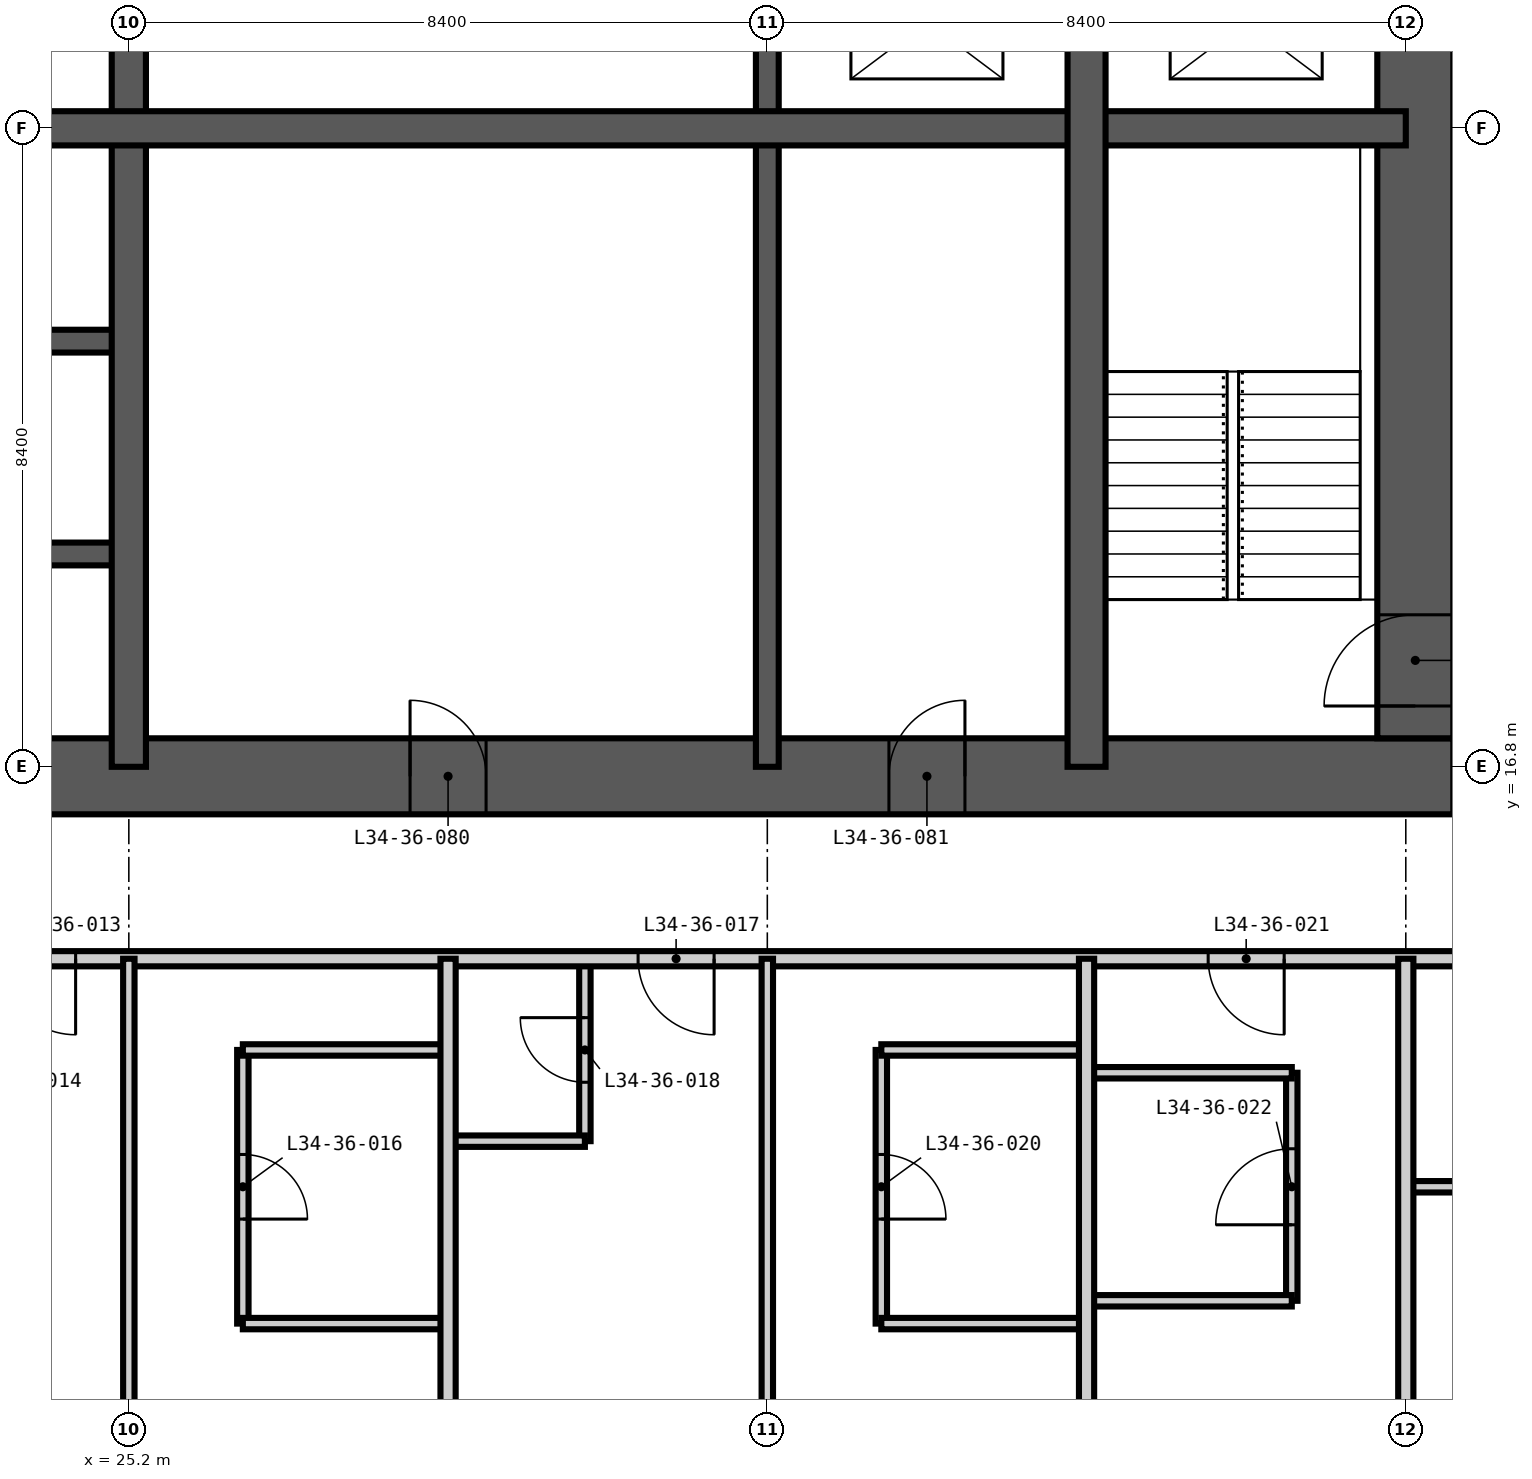
"""IFC4 building model, lengths in metres.
Left out: names, types, materials, properties, quantities, classifications, styles, units other than length and angle.
Written with IfcOpenShell. Run it as: python <this file> out.ifc"""

import sys

from ifc_helpers import new_model, si_unit, direction, frame, frame_2d, origin, place, context, subcontext, project, spatial, rectangle, extrude, element, fill, save


model = new_model("IFC4")
c1 = context("Model", 3, precision=1e-05, world=origin(), true_north=direction((0.0, 1.0)))
c2 = subcontext(c1, "Body", "Model", "MODEL_VIEW")
j1 = project(units=[si_unit("LENGTHUNIT", "METRE"), si_unit("PLANEANGLEUNIT", "RADIAN")], contexts=[c1])
p1 = place(None, origin())
s1 = spatial("IfcSite", under=j1, at=p1, CompositionType="ELEMENT")
p2 = place(p1, origin())
s2 = spatial("IfcBuilding", under=s1, at=p2, CompositionType="ELEMENT")
p3 = place(p2, frame((0.0, 0.0, 133.2)))
s3 = spatial("IfcBuildingStorey", under=s2, at=p3, CompositionType="ELEMENT", Elevation=133.2)
p4 = place(p3, frame((16.175, 16.675, -0.35), z_axis=(0.0, 0.0, 1.0), x_axis=(1.0, 0.0, 0.0)))
e1 = element("IfcWall", 1, at=p4, inside=s3, PredefinedType="SHEAR", context=c2, shape_type="SweptSolid", body=[
    extrude(rectangle(XDim=26.45, YDim=1.0, at=frame_2d((13.225, 0.0))), origin(), (0.0, 0.0, 1.0), 3.6),
])
p5 = place(p4, frame((12.725, 0.0, 0.35)))
e2 = element("IfcOpeningElement", 2, at=p5, cuts=e1, PredefinedType="OPENING", context=c2, shape_type="SweptSolid", body=[
    extrude(rectangle(XDim=1.0, YDim=2.1, at=frame_2d((0.5, 1.05))), frame((0.0, 0.51, 0.0), z_axis=(0.0, -1.0, 0.0), x_axis=(1.0, 0.0, 0.0)), (0.0, 0.0, 1.0), 1.02),
])
p6 = place(p4, frame((19.025, 0.0, 0.35)))
e3 = element("IfcOpeningElement", 3, at=p6, cuts=e1, PredefinedType="OPENING", context=c2, shape_type="SweptSolid", body=[
    extrude(rectangle(XDim=1.0, YDim=2.1, at=frame_2d((0.5, 1.05))), frame((0.0, 0.51, 0.0), z_axis=(0.0, -1.0, 0.0), x_axis=(1.0, 0.0, 0.0)), (0.0, 0.0, 1.0), 1.02),
])
p7 = place(p3, frame((42.125, 17.175, -0.35), z_axis=(0.0, 0.0, 1.0), x_axis=(0.0, 1.0, 0.0)))
e4 = element("IfcWall", 4, at=p7, inside=s3, PredefinedType="SHEAR", context=c2, shape_type="SweptSolid", body=[
    extrude(rectangle(XDim=24.45, YDim=1.0, at=frame_2d((12.225, 0.0))), origin(), (0.0, 0.0, 1.0), 3.6),
])
p8 = place(p7, frame((0.425, 0.0, 0.35)))
e5 = element("IfcOpeningElement", 5, at=p8, cuts=e4, PredefinedType="OPENING", context=c2, shape_type="SweptSolid", body=[
    extrude(rectangle(XDim=1.2, YDim=2.2, at=frame_2d((0.6, 1.1))), frame((0.0, 0.51, 0.0), z_axis=(0.0, -1.0, 0.0), x_axis=(1.0, 0.0, 0.0)), (0.0, 0.0, 1.0), 1.02),
])
p9 = place(p7, frame((11.325, 0.0, 0.35)))
e6 = element("IfcOpeningElement", 6, at=p9, cuts=e4, PredefinedType="OPENING", context=c2, shape_type="SweptSolid", body=[
    extrude(rectangle(XDim=1.8, YDim=2.2, at=frame_2d((0.9, 1.1))), frame((0.0, 0.51, 0.0), z_axis=(0.0, -1.0, 0.0), x_axis=(1.0, 0.0, 0.0)), (0.0, 0.0, 1.0), 1.02),
])
p10 = place(p7, frame((20.125, 0.0, 0.35)))
e7 = element("IfcOpeningElement", 7, at=p10, cuts=e4, PredefinedType="OPENING", context=c2, shape_type="SweptSolid", body=[
    extrude(rectangle(XDim=1.0, YDim=2.1, at=frame_2d((0.5, 1.05))), frame((0.0, 0.51, 0.0), z_axis=(0.0, -1.0, 0.0), x_axis=(1.0, 0.0, 0.0)), (0.0, 0.0, 1.0), 1.02),
])
p11 = place(p3, frame((33.6, 16.8, -0.35), z_axis=(0.0, 0.0, 1.0), x_axis=(0.0, 1.0, 0.0)))
e8 = element("IfcWall", 8, at=p11, inside=s3, PredefinedType="SHEAR", context=c2, shape_type="SweptSolid", body=[
    extrude(rectangle(XDim=25.2, YDim=0.3, at=frame_2d((12.6, 0.0))), origin(), (0.0, 0.0, 1.0), 3.6),
])
p12 = place(p11, frame((22.5, 0.0, 0.35)))
e9 = element("IfcOpeningElement", 9, at=p12, cuts=e8, PredefinedType="OPENING", context=c2, shape_type="SweptSolid", body=[
    extrude(rectangle(XDim=1.2, YDim=2.2, at=frame_2d((0.6, 1.1))), frame((0.0, 0.16, 0.0), z_axis=(0.0, -1.0, 0.0), x_axis=(1.0, 0.0, 0.0)), (0.0, 0.0, 1.0), 0.32),
])
p13 = place(p11, frame((18.3, 0.0, 0.35)))
e10 = element("IfcOpeningElement", 10, at=p13, cuts=e8, PredefinedType="OPENING", context=c2, shape_type="SweptSolid", body=[
    extrude(rectangle(XDim=1.2, YDim=2.2, at=frame_2d((0.6, 1.1))), frame((0.0, 0.16, 0.0), z_axis=(0.0, -1.0, 0.0), x_axis=(1.0, 0.0, 0.0)), (0.0, 0.0, 1.0), 0.32),
])
for number, where, z_axis, x_axis in (
    (11, (16.8, 19.6, -0.35), (0.0, 0.0, 1.0), (1.0, 0.0, 0.0)),
    (12, (16.8, 22.4, -0.35), (0.0, 0.0, 1.0), (1.0, 0.0, 0.0)),
):
    element("IfcWall", number, at=place(p3, frame(where, z_axis=z_axis, x_axis=x_axis)), inside=s3, PredefinedType="SHEAR", context=c2, shape_type="SweptSolid", body=[
        extrude(rectangle(XDim=8.4, YDim=0.3, at=frame_2d((4.2, 0.0))), origin(), (0.0, 0.0, 1.0), 3.6),
    ])
p14 = place(p3, frame((25.2, 16.8, -0.35), z_axis=(0.0, 0.0, 1.0), x_axis=(0.0, 1.0, 0.0)))
e13 = element("IfcWall", 13, at=p14, inside=s3, PredefinedType="SHEAR", context=c2, shape_type="SweptSolid", body=[
    extrude(rectangle(XDim=25.2, YDim=0.45, at=frame_2d((12.6, 0.0))), origin(), (0.0, 0.0, 1.0), 3.6),
])
p15 = place(p14, frame((12.1, 0.0, 0.35)))
e14 = element("IfcOpeningElement", 14, at=p15, cuts=e13, PredefinedType="OPENING", context=c2, shape_type="SweptSolid", body=[
    extrude(rectangle(XDim=1.0, YDim=2.1, at=frame_2d((0.5, 1.05))), frame((0.0, 0.235, 0.0), z_axis=(0.0, -1.0, 0.0), x_axis=(1.0, 0.0, 0.0)), (0.0, 0.0, 1.0), 0.47),
])
p16 = place(p3, frame((16.8, 25.2, -0.35), z_axis=(0.0, 0.0, 1.0), x_axis=(1.0, 0.0, 0.0)))
e15 = element("IfcWall", 15, at=p16, inside=s3, PredefinedType="SHEAR", context=c2, shape_type="SweptSolid", body=[
    extrude(rectangle(XDim=25.2, YDim=0.45, at=frame_2d((12.6, 0.0))), origin(), (0.0, 0.0, 1.0), 3.6),
])
p17 = place(p3, frame((37.8, 16.8, -0.35), z_axis=(0.0, 0.0, 1.0), x_axis=(0.0, 1.0, 0.0)))
e16 = element("IfcWall", 16, at=p17, inside=s3, PredefinedType="SHEAR", context=c2, shape_type="SweptSolid", body=[
    extrude(rectangle(XDim=11.2, YDim=0.5, at=frame_2d((5.6, 0.0))), origin(), (0.0, 0.0, 1.0), 3.6),
])
p18 = place(p3, frame((26.7, 9.475, 0.0), z_axis=(0.0, 0.0, 1.0), x_axis=(0.0, 1.0, 0.0)))
e17 = element("IfcWall", 17, at=p18, inside=s3, PredefinedType="PARTITIONING", context=c2, shape_type="SweptSolid", body=[
    extrude(rectangle(XDim=3.6, YDim=0.15, at=frame_2d((1.8, 0.0))), origin(), (0.0, 0.0, 1.0), 3.25),
])
p19 = place(p18, frame((1.375, 0.0, 0.0)))
e18 = element("IfcOpeningElement", 18, at=p19, cuts=e17, PredefinedType="OPENING", context=c2, shape_type="SweptSolid", body=[
    extrude(rectangle(XDim=0.85, YDim=2.1, at=frame_2d((0.425, 1.05))), frame((0.0, 0.085, 0.0), z_axis=(0.0, -1.0, 0.0), x_axis=(1.0, 0.0, 0.0)), (0.0, 0.0, 1.0), 0.17),
])
p20 = place(p3, frame((31.2, 11.875, 0.0), z_axis=(0.0, 0.0, 1.0), x_axis=(0.0, 1.0, 0.0)))
e19 = element("IfcWall", 19, at=p20, inside=s3, PredefinedType="PARTITIONING", context=c2, shape_type="SweptSolid", body=[
    extrude(rectangle(XDim=2.4, YDim=0.15, at=frame_2d((1.2, 0.0))), origin(), (0.0, 0.0, 1.0), 3.25),
])
p21 = place(p20, frame((0.775, 0.0, 0.0)))
e20 = element("IfcOpeningElement", 20, at=p21, cuts=e19, PredefinedType="OPENING", context=c2, shape_type="SweptSolid", body=[
    extrude(rectangle(XDim=0.85, YDim=2.1, at=frame_2d((0.425, 1.05))), frame((0.0, 0.085, 0.0), z_axis=(0.0, -1.0, 0.0), x_axis=(1.0, 0.0, 0.0)), (0.0, 0.0, 1.0), 0.17),
])
p22 = place(p3, frame((35.1, 9.475, 0.0), z_axis=(0.0, 0.0, 1.0), x_axis=(0.0, 1.0, 0.0)))
e21 = element("IfcWall", 21, at=p22, inside=s3, PredefinedType="PARTITIONING", context=c2, shape_type="SweptSolid", body=[
    extrude(rectangle(XDim=3.6, YDim=0.15, at=frame_2d((1.8, 0.0))), origin(), (0.0, 0.0, 1.0), 3.25),
])
p23 = place(p22, frame((1.375, 0.0, 0.0)))
e22 = element("IfcOpeningElement", 22, at=p23, cuts=e21, PredefinedType="OPENING", context=c2, shape_type="SweptSolid", body=[
    extrude(rectangle(XDim=0.85, YDim=2.1, at=frame_2d((0.425, 1.05))), frame((0.0, 0.085, 0.0), z_axis=(0.0, -1.0, 0.0), x_axis=(1.0, 0.0, 0.0)), (0.0, 0.0, 1.0), 0.17),
])
p24 = place(p3, frame((40.5, 9.775, 0.0), z_axis=(0.0, 0.0, 1.0), x_axis=(0.0, 1.0, 0.0)))
e23 = element("IfcWall", 23, at=p24, inside=s3, PredefinedType="PARTITIONING", context=c2, shape_type="SweptSolid", body=[
    extrude(rectangle(XDim=3.0, YDim=0.15, at=frame_2d((1.5, 0.0))), origin(), (0.0, 0.0, 1.0), 3.25),
])
p25 = place(p24, frame((1.0, 0.0, 0.0)))
e24 = element("IfcOpeningElement", 24, at=p25, cuts=e23, PredefinedType="OPENING", context=c2, shape_type="SweptSolid", body=[
    extrude(rectangle(XDim=1.0, YDim=2.1, at=frame_2d((0.5, 1.05))), frame((0.0, 0.085, 0.0), z_axis=(0.0, -1.0, 0.0), x_axis=(1.0, 0.0, 0.0)), (0.0, 0.0, 1.0), 0.17),
])
for number, where, z_axis, x_axis in (
    (25, (26.7, 9.475, 0.0), (0.0, 0.0, 1.0), (1.0, 0.0, 0.0)),
    (26, (35.1, 9.475, 0.0), (0.0, 0.0, 1.0), (1.0, 0.0, 0.0)),
    (27, (37.8, 9.775, 0.0), (0.0, 0.0, 1.0), (1.0, 0.0, 0.0)),
):
    element("IfcWall", number, at=place(p3, frame(where, z_axis=z_axis, x_axis=x_axis)), inside=s3, PredefinedType="PARTITIONING", context=c2, shape_type="SweptSolid", body=[
        extrude(rectangle(XDim=2.7, YDim=0.15, at=frame_2d((1.35, 0.0))), origin(), (0.0, 0.0, 1.0), 3.25),
    ])
p26 = place(p3, frame((42.0, 11.275, 0.0), z_axis=(0.0, 0.0, 1.0), x_axis=(1.0, 0.0, 0.0)))
e28 = element("IfcWall", 28, at=p26, inside=s3, PredefinedType="PARTITIONING", context=c2, shape_type="SweptSolid", body=[
    extrude(rectangle(XDim=3.725, YDim=0.15, at=frame_2d((1.863, 0.0))), origin(), (0.0, 0.0, 1.0), 3.25),
])
p27 = place(p26, frame((1.438, 0.0, 0.0)))
e29 = element("IfcOpeningElement", 29, at=p27, cuts=e28, PredefinedType="OPENING", context=c2, shape_type="SweptSolid", body=[
    extrude(rectangle(XDim=0.85, YDim=2.1, at=frame_2d((0.425, 1.05))), frame((0.0, 0.085, 0.0), z_axis=(0.0, -1.0, 0.0), x_axis=(1.0, 0.0, 0.0)), (0.0, 0.0, 1.0), 0.17),
])
p28 = place(p3, frame((29.4, 11.875, 0.0), z_axis=(0.0, 0.0, 1.0), x_axis=(1.0, 0.0, 0.0)))
e30 = element("IfcWall", 30, at=p28, inside=s3, PredefinedType="PARTITIONING", context=c2, shape_type="SweptSolid", body=[
    extrude(rectangle(XDim=1.8, YDim=0.15, at=frame_2d((0.9, 0.0))), origin(), (0.0, 0.0, 1.0), 3.25),
])
for number, where, z_axis, x_axis in (
    (31, (37.8, 12.775, 0.0), (0.0, 0.0, 1.0), (1.0, 0.0, 0.0)),
    (32, (26.7, 13.075, 0.0), (0.0, 0.0, 1.0), (1.0, 0.0, 0.0)),
    (33, (35.1, 13.075, 0.0), (0.0, 0.0, 1.0), (1.0, 0.0, 0.0)),
):
    element("IfcWall", number, at=place(p3, frame(where, z_axis=z_axis, x_axis=x_axis)), inside=s3, PredefinedType="PARTITIONING", context=c2, shape_type="SweptSolid", body=[
        extrude(rectangle(XDim=2.7, YDim=0.15, at=frame_2d((1.35, 0.0))), origin(), (0.0, 0.0, 1.0), 3.25),
    ])
p29 = place(p3, frame((45.725, 14.275, 0.0), z_axis=(0.0, 0.0, 1.0), x_axis=(-1.0, 0.0, 0.0)))
e34 = element("IfcWall", 34, at=p29, inside=s3, PredefinedType="PARTITIONING", context=c2, shape_type="SweptSolid", body=[
    extrude(rectangle(XDim=33.125, YDim=0.2, at=frame_2d((16.562, 0.0))), origin(), (0.0, 0.0, 1.0), 3.25),
])
p30 = place(p29, frame((26.325, 0.0, 0.0)))
e35 = element("IfcOpeningElement", 35, at=p30, cuts=e34, PredefinedType="OPENING", context=c2, shape_type="SweptSolid", body=[
    extrude(rectangle(XDim=1.0, YDim=2.2, at=frame_2d((0.5, 1.1))), frame((0.0, 0.11, 0.0), z_axis=(0.0, -1.0, 0.0), x_axis=(1.0, 0.0, 0.0)), (0.0, 0.0, 1.0), 0.22),
])
p31 = place(p29, frame((21.225, 0.0, 0.0)))
e36 = element("IfcOpeningElement", 36, at=p31, cuts=e34, PredefinedType="OPENING", context=c2, shape_type="SweptSolid", body=[
    extrude(rectangle(XDim=1.0, YDim=2.2, at=frame_2d((0.5, 1.1))), frame((0.0, 0.11, 0.0), z_axis=(0.0, -1.0, 0.0), x_axis=(1.0, 0.0, 0.0)), (0.0, 0.0, 1.0), 0.22),
])
p32 = place(p29, frame((12.825, 0.0, 0.0)))
e37 = element("IfcOpeningElement", 37, at=p32, cuts=e34, PredefinedType="OPENING", context=c2, shape_type="SweptSolid", body=[
    extrude(rectangle(XDim=1.0, YDim=2.2, at=frame_2d((0.5, 1.1))), frame((0.0, 0.11, 0.0), z_axis=(0.0, -1.0, 0.0), x_axis=(1.0, 0.0, 0.0)), (0.0, 0.0, 1.0), 0.22),
])
p33 = place(p29, frame((5.325, 0.0, 0.0)))
e38 = element("IfcOpeningElement", 38, at=p33, cuts=e34, PredefinedType="OPENING", context=c2, shape_type="SweptSolid", body=[
    extrude(rectangle(XDim=1.0, YDim=2.2, at=frame_2d((0.5, 1.1))), frame((0.0, 0.11, 0.0), z_axis=(0.0, -1.0, 0.0), x_axis=(1.0, 0.0, 0.0)), (0.0, 0.0, 1.0), 0.22),
])
for number, where, z_axis, x_axis in (
    (39, (29.4, -0.018, 0.0), (0.0, 0.0, 1.0), (0.0, 1.0, 0.0)),
    (40, (37.8, -0.018, 0.0), (0.0, 0.0, 1.0), (0.0, 1.0, 0.0)),
    (41, (42.0, -0.018, 0.0), (0.0, 0.0, 1.0), (0.0, 1.0, 0.0)),
):
    element("IfcWall", number, at=place(p3, frame(where, z_axis=z_axis, x_axis=x_axis)), inside=s3, PredefinedType="PARTITIONING", context=c2, shape_type="SweptSolid", body=[
        extrude(rectangle(XDim=14.293, YDim=0.2, at=frame_2d((7.146, 0.0))), origin(), (0.0, 0.0, 1.0), 3.25),
    ])
p34 = place(p3, frame((25.2, -0.018, 0.0), z_axis=(0.0, 0.0, 1.0), x_axis=(0.0, 1.0, 0.0)))
e42 = element("IfcWall", 42, at=p34, inside=s3, PredefinedType="PARTITIONING", context=c2, shape_type="SweptSolid", body=[
    extrude(rectangle(XDim=14.293, YDim=0.15, at=frame_2d((7.146, 0.0))), origin(), (0.0, 0.0, 1.0), 3.25),
])
p35 = place(p34, frame((6.706, 0.0, 0.0)))
e43 = element("IfcOpeningElement", 43, at=p35, cuts=e42, PredefinedType="OPENING", context=c2, shape_type="SweptSolid", body=[
    extrude(rectangle(XDim=0.9, YDim=2.1, at=frame_2d((0.45, 1.05))), frame((0.0, 0.085, 0.0), z_axis=(0.0, -1.0, 0.0), x_axis=(1.0, 0.0, 0.0)), (0.0, 0.0, 1.0), 0.17),
])
p36 = place(p3, frame((33.6, -0.018, 0.0), z_axis=(0.0, 0.0, 1.0), x_axis=(0.0, 1.0, 0.0)))
e44 = element("IfcWall", 44, at=p36, inside=s3, PredefinedType="PARTITIONING", context=c2, shape_type="SweptSolid", body=[
    extrude(rectangle(XDim=14.293, YDim=0.15, at=frame_2d((7.146, 0.0))), origin(), (0.0, 0.0, 1.0), 3.25),
])
p37 = place(p36, frame((6.706, 0.0, 0.0)))
e45 = element("IfcOpeningElement", 45, at=p37, cuts=e44, PredefinedType="OPENING", context=c2, shape_type="SweptSolid", body=[
    extrude(rectangle(XDim=0.9, YDim=2.1, at=frame_2d((0.45, 1.05))), frame((0.0, 0.085, 0.0), z_axis=(0.0, -1.0, 0.0), x_axis=(1.0, 0.0, 0.0)), (0.0, 0.0, 1.0), 0.17),
])
p38 = place(p8, origin())
e46 = element("IfcDoor", 46, at=p38, inside=s3, OperationType="SINGLE_SWING_LEFT", PredefinedType="DOOR", context=c2, shape_type="SweptSolid", body=[
    extrude(rectangle(XDim=1.2, YDim=2.2, at=frame_2d((0.6, 1.1))), frame((0.0, 0.025, 0.0), z_axis=(0.0, -1.0, 0.0), x_axis=(1.0, 0.0, 0.0)), (0.0, 0.0, 1.0), 0.05),
])
fill(e5, e46)
p39 = place(p31, origin())
e47 = element("IfcDoor", 47, at=p39, inside=s3, OperationType="SINGLE_SWING_LEFT", PredefinedType="DOOR", context=c2, shape_type="SweptSolid", body=[
    extrude(rectangle(XDim=1.0, YDim=2.2, at=frame_2d((0.5, 1.1))), frame((0.0, 0.025, 0.0), z_axis=(0.0, -1.0, 0.0), x_axis=(1.0, 0.0, 0.0)), (0.0, 0.0, 1.0), 0.05),
])
fill(e36, e47)
p40 = place(p19, frame((0.85, 0.0, 0.0), z_axis=(0.0, 0.0, 1.0), x_axis=(-1.0, 0.0, 0.0)))
e48 = element("IfcDoor", 48, at=p40, inside=s3, OperationType="SINGLE_SWING_RIGHT", PredefinedType="DOOR", context=c2, shape_type="SweptSolid", body=[
    extrude(rectangle(XDim=0.85, YDim=2.1, at=frame_2d((0.425, 1.05))), frame((0.0, 0.025, 0.0), z_axis=(0.0, -1.0, 0.0), x_axis=(1.0, 0.0, 0.0)), (0.0, 0.0, 1.0), 0.05),
])
fill(e18, e48)
p41 = place(p32, origin())
e49 = element("IfcDoor", 49, at=p41, inside=s3, OperationType="SINGLE_SWING_LEFT", PredefinedType="DOOR", context=c2, shape_type="SweptSolid", body=[
    extrude(rectangle(XDim=1.0, YDim=2.2, at=frame_2d((0.5, 1.1))), frame((0.0, 0.025, 0.0), z_axis=(0.0, -1.0, 0.0), x_axis=(1.0, 0.0, 0.0)), (0.0, 0.0, 1.0), 0.05),
])
fill(e37, e49)
p42 = place(p21, origin())
e50 = element("IfcDoor", 50, at=p42, inside=s3, OperationType="SINGLE_SWING_RIGHT", PredefinedType="DOOR", context=c2, shape_type="SweptSolid", body=[
    extrude(rectangle(XDim=0.85, YDim=2.1, at=frame_2d((0.425, 1.05))), frame((0.0, 0.025, 0.0), z_axis=(0.0, -1.0, 0.0), x_axis=(1.0, 0.0, 0.0)), (0.0, 0.0, 1.0), 0.05),
])
fill(e20, e50)
p43 = place(p23, frame((0.85, 0.0, 0.0), z_axis=(0.0, 0.0, 1.0), x_axis=(-1.0, 0.0, 0.0)))
e51 = element("IfcDoor", 51, at=p43, inside=s3, OperationType="SINGLE_SWING_RIGHT", PredefinedType="DOOR", context=c2, shape_type="SweptSolid", body=[
    extrude(rectangle(XDim=0.85, YDim=2.1, at=frame_2d((0.425, 1.05))), frame((0.0, 0.025, 0.0), z_axis=(0.0, -1.0, 0.0), x_axis=(1.0, 0.0, 0.0)), (0.0, 0.0, 1.0), 0.05),
])
fill(e22, e51)
p44 = place(p33, origin())
e52 = element("IfcDoor", 52, at=p44, inside=s3, OperationType="SINGLE_SWING_LEFT", PredefinedType="DOOR", context=c2, shape_type="SweptSolid", body=[
    extrude(rectangle(XDim=1.0, YDim=2.2, at=frame_2d((0.5, 1.1))), frame((0.0, 0.025, 0.0), z_axis=(0.0, -1.0, 0.0), x_axis=(1.0, 0.0, 0.0)), (0.0, 0.0, 1.0), 0.05),
])
fill(e38, e52)
p45 = place(p25, origin())
e53 = element("IfcDoor", 53, at=p45, inside=s3, OperationType="SINGLE_SWING_LEFT", PredefinedType="DOOR", context=c2, shape_type="SweptSolid", body=[
    extrude(rectangle(XDim=1.0, YDim=2.1, at=frame_2d((0.5, 1.05))), frame((0.0, 0.025, 0.0), z_axis=(0.0, -1.0, 0.0), x_axis=(1.0, 0.0, 0.0)), (0.0, 0.0, 1.0), 0.05),
])
fill(e24, e53)
p46 = place(p5, origin())
e54 = element("IfcDoor", 54, at=p46, inside=s3, OperationType="SINGLE_SWING_LEFT", PredefinedType="DOOR", context=c2, shape_type="SweptSolid", body=[
    extrude(rectangle(XDim=1.0, YDim=2.1, at=frame_2d((0.5, 1.05))), frame((0.0, 0.025, 0.0), z_axis=(0.0, -1.0, 0.0), x_axis=(1.0, 0.0, 0.0)), (0.0, 0.0, 1.0), 0.05),
])
fill(e2, e54)
p47 = place(p6, origin())
e55 = element("IfcDoor", 55, at=p47, inside=s3, OperationType="SINGLE_SWING_RIGHT", PredefinedType="DOOR", context=c2, shape_type="SweptSolid", body=[
    extrude(rectangle(XDim=1.0, YDim=2.1, at=frame_2d((0.5, 1.05))), frame((0.0, 0.025, 0.0), z_axis=(0.0, -1.0, 0.0), x_axis=(1.0, 0.0, 0.0)), (0.0, 0.0, 1.0), 0.05),
])
fill(e3, e55)
save(model, sys.argv[1])
